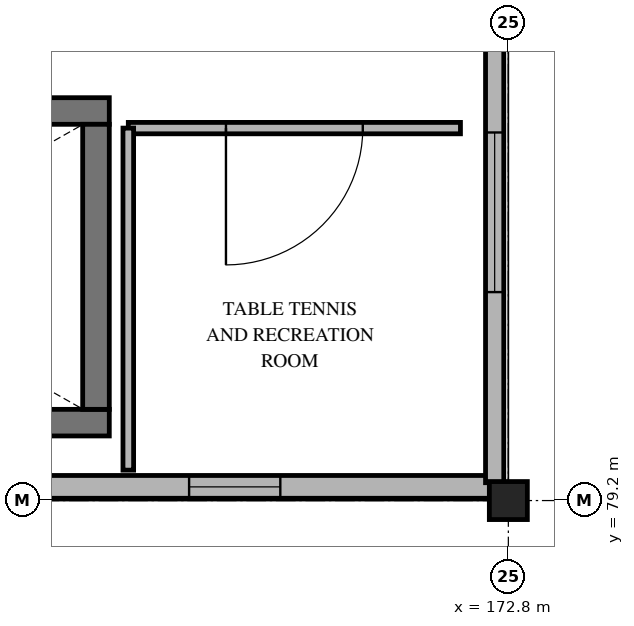
"""IFC4 building model, lengths in metres.
Left out: names, types, materials, properties, quantities, classifications, styles, units other than length and angle.
Written with IfcOpenShell. Run it as: python <this file> out.ifc"""

import sys

from ifc_helpers import new_model, si_unit, direction, frame, frame_2d, origin, origin_2d, place, context, subcontext, project, spatial, rectangle, extrude, element, fill, save


model = new_model("IFC4")
c1 = context("Model", 3, precision=1e-05, world=origin(), true_north=direction((0.0, 1.0)))
c2 = subcontext(c1, "Body", "Model", "MODEL_VIEW")
j1 = project(units=[si_unit("LENGTHUNIT", "METRE"), si_unit("PLANEANGLEUNIT", "RADIAN")], contexts=[c1])
p1 = place(None, origin())
s1 = spatial("IfcSite", under=j1, at=p1, CompositionType="ELEMENT")
p2 = place(p1, origin())
s2 = spatial("IfcBuilding", under=s1, at=p2, CompositionType="ELEMENT")
p3 = place(p2, frame((0.0, 0.0, 8.7)))
s3 = spatial("IfcBuildingStorey", under=s2, at=p3, CompositionType="ELEMENT", Elevation=8.7)
p4 = place(p3, frame((172.8, 79.2, 0.0), z_axis=(0.0, 0.0, 1.0), x_axis=(1.0, 0.0, 0.0)))
e1 = element("IfcColumn", 1, at=p4, inside=s3, PredefinedType="COLUMN", context=c2, shape_type="SweptSolid", body=[
    extrude(rectangle(XDim=0.5, YDim=0.5, at=origin_2d()), origin(), (0.0, 0.0, 1.0), 4.2),
])
p5 = place(p3, frame((172.565, 79.38, 0.0), z_axis=(0.0, 0.0, 1.0), x_axis=(-1.0, 0.0, 0.0)))
e2 = element("IfcWall", 2, at=p5, inside=s3, PredefinedType="SOLIDWALL", context=c2, shape_type="SweptSolid", body=[
    extrude(rectangle(XDim=6.73, YDim=0.3, at=frame_2d((3.365, 0.0))), origin(), (0.0, 0.0, 1.0), 3.51),
])
p6 = place(p5, frame((2.765, 0.0, 0.75)))
e3 = element("IfcOpeningElement", 3, at=p6, cuts=e2, PredefinedType="OPENING", context=c2, shape_type="SweptSolid", body=[
    extrude(rectangle(XDim=1.2, YDim=1.5, at=frame_2d((0.6, 0.75))), frame((0.0, 0.16, 0.0), z_axis=(0.0, -1.0, 0.0), x_axis=(1.0, 0.0, 0.0)), (0.0, 0.0, 1.0), 0.32),
])
p7 = place(p3, frame((172.62, 86.55, 0.0), z_axis=(0.0, 0.0, 1.0), x_axis=(0.0, -1.0, 0.0)))
e4 = element("IfcWall", 4, at=p7, inside=s3, PredefinedType="SOLIDWALL", context=c2, shape_type="SweptSolid", body=[
    extrude(rectangle(XDim=7.115, YDim=0.24, at=frame_2d((3.558, 0.0))), origin(), (0.0, 0.0, 1.0), 3.96),
])
p8 = place(p7, frame((2.508, 0.0, 0.75)))
e5 = element("IfcOpeningElement", 5, at=p8, cuts=e4, PredefinedType="OPENING", context=c2, shape_type="SweptSolid", body=[
    extrude(rectangle(XDim=2.1, YDim=1.65, at=frame_2d((1.05, 0.825))), frame((0.0, 0.13, 0.0), z_axis=(0.0, -1.0, 0.0), x_axis=(1.0, 0.0, 0.0)), (0.0, 0.0, 1.0), 0.26),
])
for number, where, z_axis, x_axis in (
    (6, (158.45, 80.225, 0.0), (0.0, 0.0, 1.0), (1.0, 0.0, 0.0)),
    (7, (167.55, 84.325, 0.0), (0.0, 0.0, 1.0), (-1.0, 0.0, 0.0)),
):
    element("IfcWall", number, at=place(p3, frame(where, z_axis=z_axis, x_axis=x_axis)), inside=s3, PredefinedType="SHEAR", context=c2, shape_type="SweptSolid", body=[
        extrude(rectangle(XDim=9.1, YDim=0.35, at=frame_2d((4.55, 0.0))), origin(), (0.0, 0.0, 1.0), 3.96),
    ])
p9 = place(p3, frame((167.375, 80.4, 0.0), z_axis=(0.0, 0.0, 1.0), x_axis=(0.0, 1.0, 0.0)))
e8 = element("IfcWall", 8, at=p9, inside=s3, PredefinedType="SHEAR", context=c2, shape_type="SweptSolid", body=[
    extrude(rectangle(XDim=3.75, YDim=0.35, at=frame_2d((1.875, 0.0))), origin(), (0.0, 0.0, 1.0), 3.96),
])
p10 = place(p3, frame((172.17, 84.1, 0.0), z_axis=(0.0, 0.0, 1.0), x_axis=(-1.0, 0.0, 0.0)))
e9 = element("IfcWall", 9, at=p10, inside=s3, PredefinedType="PARTITIONING", context=c2, shape_type="SweptSolid", body=[
    extrude(rectangle(XDim=4.37, YDim=0.15, at=frame_2d((2.185, 0.0))), origin(), (0.0, 0.0, 1.0), 3.96),
])
p11 = place(p10, frame((1.285, 0.0, 0.0)))
e10 = element("IfcOpeningElement", 10, at=p11, cuts=e9, PredefinedType="OPENING", context=c2, shape_type="SweptSolid", body=[
    extrude(rectangle(XDim=1.8, YDim=2.3, at=frame_2d((0.9, 1.15))), frame((0.0, 0.085, 0.0), z_axis=(0.0, -1.0, 0.0), x_axis=(1.0, 0.0, 0.0)), (0.0, 0.0, 1.0), 0.17),
])
p12 = place(p3, frame((167.8, 84.1, 0.0), z_axis=(0.0, 0.0, 1.0), x_axis=(0.0, -1.0, 0.0)))
e11 = element("IfcWall", 11, at=p12, inside=s3, PredefinedType="PARTITIONING", context=c2, shape_type="SweptSolid", body=[
    extrude(rectangle(XDim=4.5, YDim=0.14, at=frame_2d((2.25, 0.0))), origin(), (0.0, 0.0, 1.0), 3.96),
])
p13 = place(p6, origin())
e12 = element("IfcWindow", 12, at=p13, inside=s3, PartitioningType="SINGLE_PANEL", PredefinedType="WINDOW", context=c2, shape_type="SweptSolid", body=[
    extrude(rectangle(XDim=1.2, YDim=1.5, at=frame_2d((0.6, 0.75))), frame((0.0, 0.03, 0.0), z_axis=(0.0, -1.0, 0.0), x_axis=(1.0, 0.0, 0.0)), (0.0, 0.0, 1.0), 0.06),
])
fill(e3, e12)
p14 = place(p8, origin())
e13 = element("IfcWindow", 13, at=p14, inside=s3, PartitioningType="SINGLE_PANEL", PredefinedType="WINDOW", context=c2, shape_type="SweptSolid", body=[
    extrude(rectangle(XDim=2.1, YDim=1.65, at=frame_2d((1.05, 0.825))), frame((0.0, 0.03, 0.0), z_axis=(0.0, -1.0, 0.0), x_axis=(1.0, 0.0, 0.0)), (0.0, 0.0, 1.0), 0.06),
])
fill(e5, e13)
p15 = place(p11, origin())
e14 = element("IfcDoor", 14, at=p15, inside=s3, OperationType="SINGLE_SWING_RIGHT", PredefinedType="DOOR", context=c2, shape_type="SweptSolid", body=[
    extrude(rectangle(XDim=1.8, YDim=2.3, at=frame_2d((0.9, 1.15))), frame((0.0, 0.025, 0.0), z_axis=(0.0, -1.0, 0.0), x_axis=(1.0, 0.0, 0.0)), (0.0, 0.0, 1.0), 0.05),
])
fill(e10, e14)
save(model, sys.argv[1])
